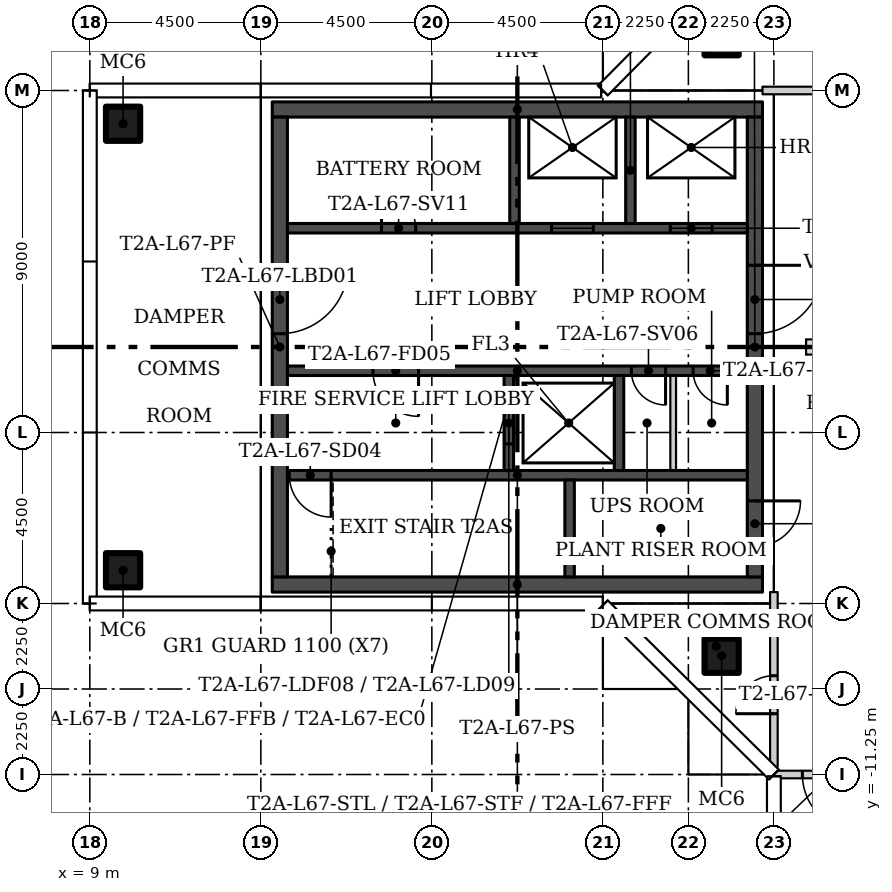
"""IFC4 building model, lengths in metres.
Left out: names, types, materials, properties, quantities, classifications, styles, units other than length and angle.
Written with IfcOpenShell. Run it as: python <this file> out.ifc"""

import sys

from ifc_helpers import new_model, si_unit, direction, frame, frame_2d, origin, origin_2d, place, context, subcontext, project, spatial, rectangle, hollow_rectangle, extrude, element, fill, save


model = new_model("IFC4")
c1 = context("Model", 3, precision=1e-05, world=origin(), true_north=direction((0.0, 1.0)))
c2 = subcontext(c1, "Body", "Model", "MODEL_VIEW")
j1 = project(units=[si_unit("LENGTHUNIT", "METRE"), si_unit("PLANEANGLEUNIT", "RADIAN")], contexts=[c1])
p1 = place(None, origin())
s1 = spatial("IfcSite", under=j1, at=p1, CompositionType="ELEMENT")
p2 = place(p1, origin())
s2 = spatial("IfcBuilding", under=s1, at=p2, CompositionType="ELEMENT")
p3 = place(p2, frame((0.0, 0.0, 278.3)))
s3 = spatial("IfcBuildingStorey", under=s2, at=p3, CompositionType="ELEMENT", Elevation=278.3)
for number, where in (
    (1, (25.625, 8.125, 0.0)),
    (2, (25.625, -8.125, 0.0)),
    (3, (9.875, -5.875, 0.0)),
    (4, (9.875, 5.875, 0.0)),
):
    element("IfcColumn", number, at=place(p3, frame(where)), inside=s3, PredefinedType="COLUMN", context=c2, shape_type="SweptSolid", body=[
        extrude(hollow_rectangle(XDim=0.9, YDim=0.9, WallThickness=0.036, at=origin_2d()), origin(), (0.0, 0.0, 1.0), 5.55),
    ])
p4 = place(p3, frame((26.7, 6.75, 0.0)))
e5 = element("IfcWall", 5, at=p4, inside=s3, PredefinedType="PARTITIONING", context=c2, shape_type="SweptSolid", body=[
    extrude(rectangle(XDim=3.15, YDim=0.2, at=frame_2d((1.575, 0.0))), origin(), (0.0, 0.0, 1.0), 5.55),
])
p5 = place(p3, frame((30.0, -11.25, 0.0), z_axis=(0.0, 0.0, 1.0), x_axis=(-1.0, 0.0, 0.0)))
e6 = element("IfcWall", 6, at=p5, inside=s3, PredefinedType="PARTITIONING", context=c2, shape_type="SweptSolid", body=[
    extrude(rectangle(XDim=3.005, YDim=0.2, at=frame_2d((1.502, 0.0))), origin(), (0.0, 0.0, 1.0), 5.55),
])
p6 = place(p5, frame((0.75, 0.0, 0.0)))
e7 = element("IfcOpeningElement", 7, at=p6, cuts=e6, PredefinedType="OPENING", context=c2, shape_type="SweptSolid", body=[
    extrude(rectangle(XDim=1.5, YDim=2.4, at=frame_2d((0.75, 1.2))), frame((0.0, 0.11, 0.0), z_axis=(0.0, -1.0, 0.0), x_axis=(1.0, 0.0, 0.0)), (0.0, 0.0, 1.0), 0.22),
])
p7 = place(p3, frame((27.0, -11.055, 0.0), z_axis=(0.0, 0.0, 1.0), x_axis=(0.0, 1.0, 0.0)))
e8 = element("IfcWall", 8, at=p7, inside=s3, PredefinedType="PARTITIONING", context=c2, shape_type="SweptSolid", body=[
    extrude(rectangle(XDim=4.605, YDim=0.2, at=frame_2d((2.302, 0.0))), origin(), (0.0, 0.0, 1.0), 5.55),
])
p8 = place(p7, frame((1.405, 0.0, 0.0)))
e9 = element("IfcOpeningElement", 9, at=p8, cuts=e8, PredefinedType="OPENING", context=c2, shape_type="SweptSolid", body=[
    extrude(rectangle(XDim=1.0, YDim=2.1, at=frame_2d((0.5, 1.05))), frame((0.0, 0.11, 0.0), z_axis=(0.0, -1.0, 0.0), x_axis=(1.0, 0.0, 0.0)), (0.0, 0.0, 1.0), 0.22),
])
for number, where in (
    (10, (13.8, -6.25, 0.0)),
    (11, (13.8, 6.25, 0.0)),
):
    element("IfcWall", number, at=place(p3, frame(where)), inside=s3, PredefinedType="SHEAR", context=c2, shape_type="SweptSolid", body=[
        extrude(rectangle(XDim=12.9, YDim=0.4, at=frame_2d((6.45, 0.0))), origin(), (0.0, 0.0, 1.0), 5.55),
    ])
p9 = place(p3, frame((14.0, 6.05, 0.0), z_axis=(0.0, 0.0, 1.0), x_axis=(0.0, -1.0, 0.0)))
e12 = element("IfcWall", 12, at=p9, inside=s3, PredefinedType="SHEAR", context=c2, shape_type="SweptSolid", body=[
    extrude(rectangle(XDim=12.1, YDim=0.4, at=frame_2d((6.05, 0.0))), origin(), (0.0, 0.0, 1.0), 5.55),
])
p10 = place(p9, frame((3.9, 0.0, 0.0)))
e13 = element("IfcOpeningElement", 13, at=p10, cuts=e12, PredefinedType="OPENING", context=c2, shape_type="SweptSolid", body=[
    extrude(rectangle(XDim=1.8, YDim=2.4, at=frame_2d((0.9, 1.2))), frame((0.0, 0.21, 0.0), z_axis=(0.0, -1.0, 0.0), x_axis=(1.0, 0.0, 0.0)), (0.0, 0.0, 1.0), 0.42),
])
p11 = place(p3, frame((26.5, 6.05, 0.0), z_axis=(0.0, 0.0, 1.0), x_axis=(0.0, -1.0, 0.0)))
e14 = element("IfcWall", 14, at=p11, inside=s3, PredefinedType="SHEAR", context=c2, shape_type="SweptSolid", body=[
    extrude(rectangle(XDim=12.1, YDim=0.4, at=frame_2d((6.05, 0.0))), origin(), (0.0, 0.0, 1.0), 5.55),
])
p12 = place(p11, frame((10.1, 0.0, 0.0)))
e15 = element("IfcOpeningElement", 15, at=p12, cuts=e14, PredefinedType="OPENING", context=c2, shape_type="SweptSolid", body=[
    extrude(rectangle(XDim=1.2, YDim=2.1, at=frame_2d((0.6, 1.05))), frame((0.0, 0.21, 0.0), z_axis=(0.0, -1.0, 0.0), x_axis=(1.0, 0.0, 0.0)), (0.0, 0.0, 1.0), 0.42),
])
p13 = place(p11, frame((3.9, 0.0, 0.0)))
e16 = element("IfcOpeningElement", 16, at=p13, cuts=e14, PredefinedType="OPENING", context=c2, shape_type="SweptSolid", body=[
    extrude(rectangle(XDim=1.8, YDim=2.4, at=frame_2d((0.9, 1.2))), frame((0.0, 0.21, 0.0), z_axis=(0.0, -1.0, 0.0), x_axis=(1.0, 0.0, 0.0)), (0.0, 0.0, 1.0), 0.42),
])
p14 = place(p3, frame((26.3, -3.375, 0.0), z_axis=(0.0, 0.0, 1.0), x_axis=(-1.0, 0.0, 0.0)))
e17 = element("IfcWall", 17, at=p14, inside=s3, PredefinedType="SHEAR", context=c2, shape_type="SweptSolid", body=[
    extrude(rectangle(XDim=12.1, YDim=0.25, at=frame_2d((6.05, 0.0))), origin(), (0.0, 0.0, 1.0), 5.55),
])
p15 = place(p14, frame((10.95, 0.0, 0.0)))
e18 = element("IfcOpeningElement", 18, at=p15, cuts=e17, PredefinedType="OPENING", context=c2, shape_type="SweptSolid", body=[
    extrude(rectangle(XDim=1.1, YDim=2.1, at=frame_2d((0.55, 1.05))), frame((0.0, 0.135, 0.0), z_axis=(0.0, -1.0, 0.0), x_axis=(1.0, 0.0, 0.0)), (0.0, 0.0, 1.0), 0.27),
])
p16 = place(p3, frame((21.625, -6.05, 0.0), z_axis=(0.0, 0.0, 1.0), x_axis=(0.0, 1.0, 0.0)))
e19 = element("IfcWall", 19, at=p16, inside=s3, PredefinedType="SHEAR", context=c2, shape_type="SweptSolid", body=[
    extrude(rectangle(XDim=2.55, YDim=0.25, at=frame_2d((1.275, 0.0))), origin(), (0.0, 0.0, 1.0), 5.55),
])
p17 = place(p3, frame((26.3, -0.625, 0.0), z_axis=(0.0, 0.0, 1.0), x_axis=(-1.0, 0.0, 0.0)))
e20 = element("IfcWall", 20, at=p17, inside=s3, PredefinedType="SHEAR", context=c2, shape_type="SweptSolid", body=[
    extrude(rectangle(XDim=12.1, YDim=0.25, at=frame_2d((6.05, 0.0))), origin(), (0.0, 0.0, 1.0), 5.55),
])
p18 = place(p17, frame((8.65, 0.0, 0.0)))
e21 = element("IfcOpeningElement", 21, at=p18, cuts=e20, PredefinedType="OPENING", context=c2, shape_type="SweptSolid", body=[
    extrude(rectangle(XDim=1.2, YDim=2.1, at=frame_2d((0.6, 1.05))), frame((0.0, 0.135, 0.0), z_axis=(0.0, -1.0, 0.0), x_axis=(1.0, 0.0, 0.0)), (0.0, 0.0, 1.0), 0.27),
])
p19 = place(p17, frame((2.15, 0.0, 0.0)))
e22 = element("IfcOpeningElement", 22, at=p19, cuts=e20, PredefinedType="OPENING", context=c2, shape_type="SweptSolid", body=[
    extrude(rectangle(XDim=0.9, YDim=2.1, at=frame_2d((0.45, 1.05))), frame((0.0, 0.135, 0.0), z_axis=(0.0, -1.0, 0.0), x_axis=(1.0, 0.0, 0.0)), (0.0, 0.0, 1.0), 0.27),
])
p20 = place(p17, frame((0.525, 0.0, 0.0)))
e23 = element("IfcOpeningElement", 23, at=p20, cuts=e20, PredefinedType="OPENING", context=c2, shape_type="SweptSolid", body=[
    extrude(rectangle(XDim=0.9, YDim=2.1, at=frame_2d((0.45, 1.05))), frame((0.0, 0.135, 0.0), z_axis=(0.0, -1.0, 0.0), x_axis=(1.0, 0.0, 0.0)), (0.0, 0.0, 1.0), 0.27),
])
p21 = place(p3, frame((20.025, -3.25, 0.0), z_axis=(0.0, 0.0, 1.0), x_axis=(0.0, 1.0, 0.0)))
e24 = element("IfcWall", 24, at=p21, inside=s3, PredefinedType="SHEAR", context=c2, shape_type="SweptSolid", body=[
    extrude(rectangle(XDim=2.5, YDim=0.25, at=frame_2d((1.25, 0.0))), origin(), (0.0, 0.0, 1.0), 5.55),
])
p22 = place(p21, frame((0.7, 0.0, 0.0)))
e25 = element("IfcOpeningElement", 25, at=p22, cuts=e24, PredefinedType="OPENING", context=c2, shape_type="SweptSolid", body=[
    extrude(rectangle(XDim=1.1, YDim=2.1, at=frame_2d((0.55, 1.05))), frame((0.0, 0.135, 0.0), z_axis=(0.0, -1.0, 0.0), x_axis=(1.0, 0.0, 0.0)), (0.0, 0.0, 1.0), 0.27),
])
p23 = place(p3, frame((22.925, -3.25, 0.0), z_axis=(0.0, 0.0, 1.0), x_axis=(0.0, 1.0, 0.0)))
e26 = element("IfcWall", 26, at=p23, inside=s3, PredefinedType="SHEAR", context=c2, shape_type="SweptSolid", body=[
    extrude(rectangle(XDim=2.5, YDim=0.25, at=frame_2d((1.25, 0.0))), origin(), (0.0, 0.0, 1.0), 5.55),
])
p24 = place(p3, frame((24.35, -3.25, 0.0), z_axis=(0.0, 0.0, 1.0), x_axis=(0.0, 1.0, 0.0)))
e27 = element("IfcWall", 27, at=p24, inside=s3, PredefinedType="PARTITIONING", context=c2, shape_type="SweptSolid", body=[
    extrude(rectangle(XDim=2.5, YDim=0.15, at=frame_2d((1.25, 0.0))), origin(), (0.0, 0.0, 1.0), 5.55),
])
p25 = place(p3, frame((14.2, 3.125, 0.0)))
e28 = element("IfcWall", 28, at=p25, inside=s3, PredefinedType="SHEAR", context=c2, shape_type="SweptSolid", body=[
    extrude(rectangle(XDim=12.1, YDim=0.25, at=frame_2d((6.05, 0.0))), origin(), (0.0, 0.0, 1.0), 5.55),
])
p26 = place(p25, frame((6.95, 0.0, 0.0)))
e29 = element("IfcOpeningElement", 29, at=p26, cuts=e28, PredefinedType="OPENING", context=c2, shape_type="SweptSolid", body=[
    extrude(rectangle(XDim=1.1, YDim=2.1, at=frame_2d((0.55, 1.05))), frame((0.0, 0.135, 0.0), z_axis=(0.0, -1.0, 0.0), x_axis=(1.0, 0.0, 0.0)), (0.0, 0.0, 1.0), 0.27),
])
p27 = place(p25, frame((10.075, 0.0, 0.0)))
e30 = element("IfcOpeningElement", 30, at=p27, cuts=e28, PredefinedType="OPENING", context=c2, shape_type="SweptSolid", body=[
    extrude(rectangle(XDim=1.1, YDim=2.1, at=frame_2d((0.55, 1.05))), frame((0.0, 0.135, 0.0), z_axis=(0.0, -1.0, 0.0), x_axis=(1.0, 0.0, 0.0)), (0.0, 0.0, 1.0), 0.27),
])
p28 = place(p25, frame((2.475, 0.0, 0.0)))
e31 = element("IfcOpeningElement", 31, at=p28, cuts=e28, PredefinedType="OPENING", context=c2, shape_type="SweptSolid", body=[
    extrude(rectangle(XDim=0.9, YDim=2.1, at=frame_2d((0.45, 1.05))), frame((0.0, 0.135, 0.0), z_axis=(0.0, -1.0, 0.0), x_axis=(1.0, 0.0, 0.0)), (0.0, 0.0, 1.0), 0.27),
])
for number, where, z_axis, x_axis in (
    (32, (20.175, 3.25, 0.0), (0.0, 0.0, 1.0), (0.0, 1.0, 0.0)),
    (33, (23.225, 3.25, 0.0), (0.0, 0.0, 1.0), (0.0, 1.0, 0.0)),
):
    element("IfcWall", number, at=place(p3, frame(where, z_axis=z_axis, x_axis=x_axis)), inside=s3, PredefinedType="SHEAR", context=c2, shape_type="SweptSolid", body=[
        extrude(rectangle(XDim=2.8, YDim=0.25, at=frame_2d((1.4, 0.0))), origin(), (0.0, 0.0, 1.0), 5.55),
    ])
p29 = place(p6, origin())
e34 = element("IfcDoor", 34, at=p29, inside=s3, OperationType="DOUBLE_DOOR_SINGLE_SWING", PredefinedType="DOOR", context=c2, shape_type="SweptSolid", body=[
    extrude(rectangle(XDim=1.5, YDim=2.4, at=frame_2d((0.75, 1.2))), frame((0.0, 0.025, 0.0), z_axis=(0.0, -1.0, 0.0), x_axis=(1.0, 0.0, 0.0)), (0.0, 0.0, 1.0), 0.05),
])
fill(e7, e34)
p30 = place(p8, origin())
e35 = element("IfcDoor", 35, at=p30, inside=s3, OperationType="SINGLE_SWING_RIGHT", PredefinedType="DOOR", context=c2, shape_type="SweptSolid", body=[
    extrude(rectangle(XDim=1.0, YDim=2.1, at=frame_2d((0.5, 1.05))), frame((0.0, 0.025, 0.0), z_axis=(0.0, -1.0, 0.0), x_axis=(1.0, 0.0, 0.0)), (0.0, 0.0, 1.0), 0.05),
])
fill(e9, e35)
p31 = place(p10, origin())
e36 = element("IfcDoor", 36, at=p31, inside=s3, OperationType="DOUBLE_DOOR_SINGLE_SWING", PredefinedType="DOOR", context=c2, shape_type="SweptSolid", body=[
    extrude(rectangle(XDim=1.8, YDim=2.4, at=frame_2d((0.9, 1.2))), frame((0.0, 0.025, 0.0), z_axis=(0.0, -1.0, 0.0), x_axis=(1.0, 0.0, 0.0)), (0.0, 0.0, 1.0), 0.05),
])
fill(e13, e36)
p32 = place(p12, origin())
e37 = element("IfcDoor", 37, at=p32, inside=s3, OperationType="SINGLE_SWING_RIGHT", PredefinedType="DOOR", context=c2, shape_type="SweptSolid", body=[
    extrude(rectangle(XDim=1.2, YDim=2.1, at=frame_2d((0.6, 1.05))), frame((0.0, 0.025, 0.0), z_axis=(0.0, -1.0, 0.0), x_axis=(1.0, 0.0, 0.0)), (0.0, 0.0, 1.0), 0.05),
])
fill(e15, e37)
p33 = place(p13, origin())
e38 = element("IfcDoor", 38, at=p33, inside=s3, OperationType="DOUBLE_DOOR_SINGLE_SWING", PredefinedType="DOOR", context=c2, shape_type="SweptSolid", body=[
    extrude(rectangle(XDim=1.8, YDim=2.4, at=frame_2d((0.9, 1.2))), frame((0.0, 0.025, 0.0), z_axis=(0.0, -1.0, 0.0), x_axis=(1.0, 0.0, 0.0)), (0.0, 0.0, 1.0), 0.05),
])
fill(e16, e38)
p34 = place(p15, origin())
e39 = element("IfcDoor", 39, at=p34, inside=s3, OperationType="SINGLE_SWING_RIGHT", PredefinedType="DOOR", context=c2, shape_type="SweptSolid", body=[
    extrude(rectangle(XDim=1.1, YDim=2.1, at=frame_2d((0.55, 1.05))), frame((0.0, 0.025, 0.0), z_axis=(0.0, -1.0, 0.0), x_axis=(1.0, 0.0, 0.0)), (0.0, 0.0, 1.0), 0.05),
])
fill(e18, e39)
p35 = place(p18, origin())
e40 = element("IfcDoor", 40, at=p35, inside=s3, OperationType="SINGLE_SWING_RIGHT", PredefinedType="DOOR", context=c2, shape_type="SweptSolid", body=[
    extrude(rectangle(XDim=1.2, YDim=2.1, at=frame_2d((0.6, 1.05))), frame((0.0, 0.025, 0.0), z_axis=(0.0, -1.0, 0.0), x_axis=(1.0, 0.0, 0.0)), (0.0, 0.0, 1.0), 0.05),
])
fill(e21, e40)
p36 = place(p19, origin())
e41 = element("IfcDoor", 41, at=p36, inside=s3, OperationType="SINGLE_SWING_LEFT", PredefinedType="DOOR", context=c2, shape_type="SweptSolid", body=[
    extrude(rectangle(XDim=0.9, YDim=2.1, at=frame_2d((0.45, 1.05))), frame((0.0, 0.025, 0.0), z_axis=(0.0, -1.0, 0.0), x_axis=(1.0, 0.0, 0.0)), (0.0, 0.0, 1.0), 0.05),
])
fill(e22, e41)
p37 = place(p20, origin())
e42 = element("IfcDoor", 42, at=p37, inside=s3, OperationType="SINGLE_SWING_LEFT", PredefinedType="DOOR", context=c2, shape_type="SweptSolid", body=[
    extrude(rectangle(XDim=0.9, YDim=2.1, at=frame_2d((0.45, 1.05))), frame((0.0, 0.025, 0.0), z_axis=(0.0, -1.0, 0.0), x_axis=(1.0, 0.0, 0.0)), (0.0, 0.0, 1.0), 0.05),
])
fill(e23, e42)
p38 = place(p22, origin())
e43 = element("IfcDoor", 43, at=p38, inside=s3, OperationType="SLIDING_TO_LEFT", PredefinedType="DOOR", context=c2, shape_type="SweptSolid", body=[
    extrude(rectangle(XDim=1.1, YDim=2.1, at=frame_2d((0.55, 1.05))), frame((0.0, 0.025, 0.0), z_axis=(0.0, -1.0, 0.0), x_axis=(1.0, 0.0, 0.0)), (0.0, 0.0, 1.0), 0.05),
])
fill(e25, e43)
p39 = place(p26, origin())
e44 = element("IfcDoor", 44, at=p39, inside=s3, OperationType="SLIDING_TO_LEFT", PredefinedType="DOOR", context=c2, shape_type="SweptSolid", body=[
    extrude(rectangle(XDim=1.1, YDim=2.1, at=frame_2d((0.55, 1.05))), frame((0.0, 0.025, 0.0), z_axis=(0.0, -1.0, 0.0), x_axis=(1.0, 0.0, 0.0)), (0.0, 0.0, 1.0), 0.05),
])
fill(e29, e44)
p40 = place(p27, origin())
e45 = element("IfcDoor", 45, at=p40, inside=s3, OperationType="SLIDING_TO_LEFT", PredefinedType="DOOR", context=c2, shape_type="SweptSolid", body=[
    extrude(rectangle(XDim=1.1, YDim=2.1, at=frame_2d((0.55, 1.05))), frame((0.0, 0.025, 0.0), z_axis=(0.0, -1.0, 0.0), x_axis=(1.0, 0.0, 0.0)), (0.0, 0.0, 1.0), 0.05),
])
fill(e30, e45)
p41 = place(p28, origin())
e46 = element("IfcDoor", 46, at=p41, inside=s3, OperationType="SINGLE_SWING_LEFT", PredefinedType="DOOR", context=c2, shape_type="SweptSolid", body=[
    extrude(rectangle(XDim=0.9, YDim=2.1, at=frame_2d((0.45, 1.05))), frame((0.0, 0.025, 0.0), z_axis=(0.0, -1.0, 0.0), x_axis=(1.0, 0.0, 0.0)), (0.0, 0.0, 1.0), 0.05),
])
fill(e31, e46)
save(model, sys.argv[1])
